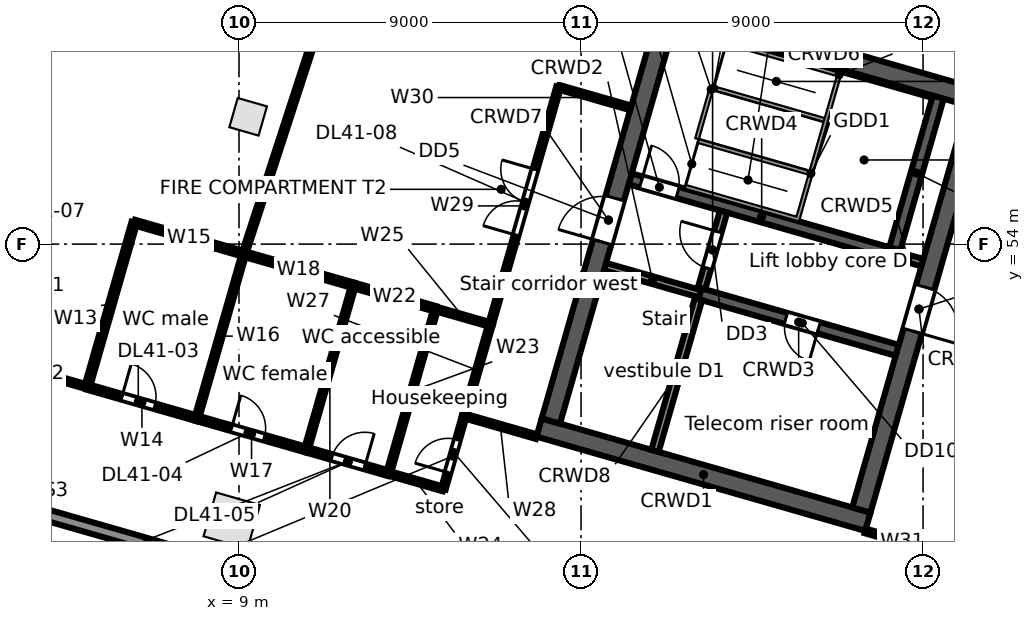
"""IFC4 building model, lengths in metres.
Left out: names, types, materials, properties, quantities, classifications, styles, units other than length and angle.
Written with IfcOpenShell. Run it as: python <this file> out.ifc"""

import sys

from ifc_helpers import new_model, si_unit, direction, frame, frame_2d, origin, origin_2d, place, context, subcontext, project, spatial, rectangle, extrude, element, fill, save


model = new_model("IFC4")
c1 = context("Model", 3, precision=1e-05, world=origin(), true_north=direction((0.0, 1.0)))
c2 = subcontext(c1, "Body", "Model", "MODEL_VIEW")
j1 = project(units=[si_unit("LENGTHUNIT", "METRE"), si_unit("PLANEANGLEUNIT", "RADIAN")], contexts=[c1])
p1 = place(None, origin())
s1 = spatial("IfcSite", under=j1, at=p1, CompositionType="ELEMENT")
p2 = place(p1, origin())
s2 = spatial("IfcBuilding", under=s1, at=p2, CompositionType="ELEMENT")
p3 = place(p2, frame((0.0, 0.0, 190.9)))
s3 = spatial("IfcBuildingStorey", under=s2, at=p3, CompositionType="ELEMENT", Elevation=190.9)
p4 = place(p3, frame((8.81, 46.722, 0.0), z_axis=(0.0, 0.0, 1.0), x_axis=(0.961261695938, -0.275637355817, 0.0)))
e1 = element("IfcColumn", 1, at=p4, inside=s3, PredefinedType="COLUMN", context=c2, shape_type="SweptSolid", body=[
    extrude(rectangle(XDim=1.2, YDim=1.2, at=origin_2d()), origin(), (0.0, 0.0, 1.0), 4.0),
])
p5 = place(p3, frame((9.241, 57.35, 0.0), z_axis=(0.0, 0.0, 1.0), x_axis=(0.961261695938, -0.275637355817, 0.0)))
e2 = element("IfcColumn", 2, at=p5, inside=s3, PredefinedType="COLUMN", context=c2, shape_type="SweptSolid", body=[
    extrude(rectangle(XDim=0.8, YDim=0.8, at=origin_2d()), origin(), (0.0, 0.0, 1.0), 4.0),
])
p6 = place(p3, frame((24.042, 41.106, 0.0), z_axis=(0.0, 0.0, 1.0), x_axis=(-0.961261693976, 0.275637362661, 0.0)))
e3 = element("IfcWall", 3, at=p6, inside=s3, PredefinedType="STANDARD", context=c2, shape_type="SweptSolid", body=[
    extrude(rectangle(XDim=24.948, YDim=0.3, at=frame_2d((12.474, 0.0))), origin(), (0.0, 0.0, 1.0), 3.68),
])
p7 = place(p6, frame((21.441, 0.0, 0.6)))
e4 = element("IfcOpeningElement", 4, at=p7, cuts=e3, PredefinedType="OPENING", context=c2, shape_type="SweptSolid", body=[
    extrude(rectangle(XDim=0.9, YDim=2.4, at=frame_2d((0.45, 1.2))), frame((0.0, 0.16, 0.0), z_axis=(0.0, -1.0, 0.0), x_axis=(1.0, 0.0, 0.0)), (0.0, 0.0, 1.0), 0.32),
])
p8 = place(p6, frame((13.121, 0.0, 0.6)))
e5 = element("IfcOpeningElement", 5, at=p8, cuts=e3, PredefinedType="OPENING", context=c2, shape_type="SweptSolid", body=[
    extrude(rectangle(XDim=0.9, YDim=2.4, at=frame_2d((0.45, 1.2))), frame((0.0, 0.16, 0.0), z_axis=(0.0, -1.0, 0.0), x_axis=(1.0, 0.0, 0.0)), (0.0, 0.0, 1.0), 0.32),
])
p9 = place(p6, frame((10.591, 0.0, 0.0)))
e6 = element("IfcOpeningElement", 6, at=p9, cuts=e3, PredefinedType="OPENING", context=c2, shape_type="SweptSolid", body=[
    extrude(rectangle(XDim=1.8, YDim=2.4, at=frame_2d((0.9, 1.2))), frame((0.0, 0.16, 0.0), z_axis=(0.0, -1.0, 0.0), x_axis=(1.0, 0.0, 0.0)), (0.0, 0.0, 1.0), 0.32),
])
p10 = place(p6, frame((4.8, 0.0, 0.6)))
e7 = element("IfcOpeningElement", 7, at=p10, cuts=e3, PredefinedType="OPENING", context=c2, shape_type="SweptSolid", body=[
    extrude(rectangle(XDim=0.9, YDim=2.4, at=frame_2d((0.45, 1.2))), frame((0.0, 0.16, 0.0), z_axis=(0.0, -1.0, 0.0), x_axis=(1.0, 0.0, 0.0)), (0.0, 0.0, 1.0), 0.32),
])
p11 = place(p6, frame((2.27, 0.0, 0.0)))
e8 = element("IfcOpeningElement", 8, at=p11, cuts=e3, PredefinedType="OPENING", context=c2, shape_type="SweptSolid", body=[
    extrude(rectangle(XDim=1.8, YDim=2.4, at=frame_2d((0.9, 1.2))), frame((0.0, 0.16, 0.0), z_axis=(0.0, -1.0, 0.0), x_axis=(1.0, 0.0, 0.0)), (0.0, 0.0, 1.0), 0.32),
])
p12 = place(p3, frame((37.399, 59.851, 0.0), z_axis=(0.0, 0.0, 1.0), x_axis=(-0.529919986982, -0.848047644532, 0.0)))
e9 = element("IfcWall", 9, at=p12, inside=s3, PredefinedType="STANDARD", context=c2, shape_type="SweptSolid", body=[
    extrude(rectangle(XDim=21.125, YDim=0.3, at=frame_2d((10.562, 0.0))), origin(), (0.0, 0.0, 1.0), 3.68),
])
p13 = place(p12, frame((16.687, 0.0, 0.6)))
e10 = element("IfcOpeningElement", 10, at=p13, cuts=e9, PredefinedType="OPENING", context=c2, shape_type="SweptSolid", body=[
    extrude(rectangle(XDim=0.9, YDim=2.4, at=frame_2d((0.45, 1.2))), frame((0.0, 0.16, 0.0), z_axis=(0.0, -1.0, 0.0), x_axis=(1.0, 0.0, 0.0)), (0.0, 0.0, 1.0), 0.32),
])
p14 = place(p12, frame((6.187, 0.0, 0.6)))
e11 = element("IfcOpeningElement", 11, at=p14, cuts=e9, PredefinedType="OPENING", context=c2, shape_type="SweptSolid", body=[
    extrude(rectangle(XDim=0.9, YDim=2.4, at=frame_2d((0.45, 1.2))), frame((0.0, 0.16, 0.0), z_axis=(0.0, -1.0, 0.0), x_axis=(1.0, 0.0, 0.0)), (0.0, 0.0, 1.0), 0.32),
])
p15 = place(p3, frame((16.897, 49.173, 0.0), z_axis=(0.0, 0.0, 1.0), x_axis=(0.96126248289, -0.275634611374, 0.0)))
e12 = element("IfcWall", 12, at=p15, inside=s3, PredefinedType="SOLIDWALL", context=c2, shape_type="SweptSolid", body=[
    extrude(rectangle(XDim=9.0, YDim=0.5, at=frame_2d((4.5, 0.0))), origin(), (0.0, 0.0, 1.0), 3.68),
])
p16 = place(p3, frame((18.632, 53.409, 0.0), z_axis=(0.0, 0.0, 1.0), x_axis=(0.961247078216, -0.275688328772, 0.0)))
e13 = element("IfcWall", 13, at=p16, inside=s3, PredefinedType="SOLIDWALL", context=c2, shape_type="SweptSolid", body=[
    extrude(rectangle(XDim=2.6, YDim=0.2, at=frame_2d((1.3, 0.0))), origin(), (0.0, 0.0, 1.0), 3.68),
])
p17 = place(p3, frame((21.131, 52.692, 0.0), z_axis=(0.0, 0.0, 1.0), x_axis=(0.961271043721, -0.27560475414, 0.0)))
e14 = element("IfcWall", 14, at=p17, inside=s3, PredefinedType="SOLIDWALL", context=c2, shape_type="SweptSolid", body=[
    extrude(rectangle(XDim=5.4, YDim=0.3, at=frame_2d((2.7, 0.0))), origin(), (0.0, 0.0, 1.0), 3.68),
])
p18 = place(p17, frame((2.35, 0.0, 0.0)))
e15 = element("IfcOpeningElement", 15, at=p18, cuts=e14, PredefinedType="OPENING", context=c2, shape_type="SweptSolid", body=[
    extrude(rectangle(XDim=0.9, YDim=2.1, at=frame_2d((0.45, 1.05))), frame((0.0, 0.16, 0.0), z_axis=(0.0, -1.0, 0.0), x_axis=(1.0, 0.0, 0.0)), (0.0, 0.0, 1.0), 0.32),
])
p19 = place(p3, frame((19.293, 55.716, 0.0), z_axis=(0.0, 0.0, 1.0), x_axis=(0.96125862491, -0.275648065539, 0.0)))
e16 = element("IfcWall", 16, at=p19, inside=s3, PredefinedType="SOLIDWALL", context=c2, shape_type="SweptSolid", body=[
    extrude(rectangle(XDim=7.2, YDim=0.3, at=frame_2d((3.6, 0.0))), origin(), (0.0, 0.0, 1.0), 3.68),
])
p20 = place(p19, frame((0.3, 0.0, 0.0)))
e17 = element("IfcOpeningElement", 17, at=p20, cuts=e16, PredefinedType="OPENING", context=c2, shape_type="SweptSolid", body=[
    extrude(rectangle(XDim=1.0, YDim=2.1, at=frame_2d((0.5, 1.05))), frame((0.0, 0.16, 0.0), z_axis=(0.0, -1.0, 0.0), x_axis=(1.0, 0.0, 0.0)), (0.0, 0.0, 1.0), 0.32),
])
p21 = place(p3, frame((26.214, 53.732, 0.0), z_axis=(0.0, 0.0, 1.0), x_axis=(0.961200870072, -0.275849392554, 0.0)))
e18 = element("IfcWall", 18, at=p21, inside=s3, PredefinedType="SOLIDWALL", context=c2, shape_type="SweptSolid", body=[
    extrude(rectangle(XDim=0.8, YDim=0.2, at=frame_2d((0.4, 0.0))), origin(), (0.0, 0.0, 1.0), 3.68),
])
p22 = place(p3, frame((20.067, 60.228, 0.0), z_axis=(0.0, 0.0, 1.0), x_axis=(0.96126248289, -0.275634611374, 0.0)))
e19 = element("IfcWall", 19, at=p22, inside=s3, PredefinedType="SOLIDWALL", context=c2, shape_type="SweptSolid", body=[
    extrude(rectangle(XDim=9.0, YDim=0.5, at=frame_2d((4.5, 0.0))), origin(), (0.0, 0.0, 1.0), 3.68),
])
p23 = place(p3, frame((17.206, 49.344, 0.0), z_axis=(0.0, 0.0, 1.0), x_axis=(0.275632651182, 0.961263044958, 0.0)))
e20 = element("IfcWall", 20, at=p23, inside=s3, PredefinedType="SOLIDWALL", context=c2, shape_type="SweptSolid", body=[
    extrude(rectangle(XDim=11.0, YDim=0.5, at=frame_2d((5.5, 0.0))), origin(), (0.0, 0.0, 1.0), 3.68),
])
p24 = place(p23, frame((4.9, 0.0, 0.0)))
e21 = element("IfcOpeningElement", 21, at=p24, cuts=e20, PredefinedType="OPENING", context=c2, shape_type="SweptSolid", body=[
    extrude(rectangle(XDim=1.2, YDim=2.1, at=frame_2d((0.6, 1.05))), frame((0.0, 0.26, 0.0), z_axis=(0.0, -1.0, 0.0), x_axis=(1.0, 0.0, 0.0)), (0.0, 0.0, 1.0), 0.52),
])
p25 = place(p3, frame((19.946, 48.559, 0.0), z_axis=(0.0, 0.0, 1.0), x_axis=(0.275668905258, 0.961252648721, 0.0)))
e22 = element("IfcWall", 22, at=p25, inside=s3, PredefinedType="SOLIDWALL", context=c2, shape_type="SweptSolid", body=[
    extrude(rectangle(XDim=4.15, YDim=0.2, at=frame_2d((2.075, 0.0))), origin(), (0.0, 0.0, 1.0), 3.68),
])
p26 = place(p3, frame((21.172, 52.837, 0.0), z_axis=(0.0, 0.0, 1.0), x_axis=(0.275657676022, 0.961255868981, 0.0)))
e23 = element("IfcWall", 23, at=p26, inside=s3, PredefinedType="PARTITIONING", context=c2, shape_type="SweptSolid", body=[
    extrude(rectangle(XDim=2.1, YDim=0.2, at=frame_2d((1.05, 0.0))), origin(), (0.0, 0.0, 1.0), 3.68),
])
p27 = place(p26, frame((0.55, 0.0, 0.0)))
e24 = element("IfcOpeningElement", 24, at=p27, cuts=e23, PredefinedType="OPENING", context=c2, shape_type="SweptSolid", body=[
    extrude(rectangle(XDim=1.0, YDim=2.1, at=frame_2d((0.5, 1.05))), frame((0.0, 0.11, 0.0), z_axis=(0.0, -1.0, 0.0), x_axis=(1.0, 0.0, 0.0)), (0.0, 0.0, 1.0), 0.22),
])
p28 = place(p3, frame((26.256, 53.876, 0.0), z_axis=(0.0, 0.0, 1.0), x_axis=(0.275614546295, 0.961268236171, 0.0)))
e25 = element("IfcWall", 25, at=p28, inside=s3, PredefinedType="SOLIDWALL", context=c2, shape_type="SweptSolid", body=[
    extrude(rectangle(XDim=4.15, YDim=0.3, at=frame_2d((2.075, 0.0))), origin(), (0.0, 0.0, 1.0), 3.68),
])
p29 = place(p3, frame((25.377, 47.002, 0.0), z_axis=(0.0, 0.0, 1.0), x_axis=(0.275632651182, 0.961263044958, 0.0)))
e26 = element("IfcWall", 26, at=p29, inside=s3, PredefinedType="SOLIDWALL", context=c2, shape_type="SweptSolid", body=[
    extrude(rectangle(XDim=11.0, YDim=0.5, at=frame_2d((5.5, 0.0))), origin(), (0.0, 0.0, 1.0), 3.68),
])
p30 = place(p29, frame((4.9, 0.0, 0.0)))
e27 = element("IfcOpeningElement", 27, at=p30, cuts=e26, PredefinedType="OPENING", context=c2, shape_type="SweptSolid", body=[
    extrude(rectangle(XDim=1.2, YDim=2.1, at=frame_2d((0.6, 1.05))), frame((0.0, 0.26, 0.0), z_axis=(0.0, -1.0, 0.0), x_axis=(1.0, 0.0, 0.0)), (0.0, 0.0, 1.0), 0.52),
])
p31 = place(p3, frame((2.601, 50.932, 0.0), z_axis=(0.0, 0.0, 1.0), x_axis=(0.961265528111, -0.275623991092, 0.0)))
e28 = element("IfcWall", 28, at=p31, inside=s3, PredefinedType="PARTITIONING", context=c2, shape_type="SweptSolid", body=[
    extrude(rectangle(XDim=2.5, YDim=0.125, at=frame_2d((1.25, 0.0))), origin(), (0.0, 0.0, 1.0), 3.68),
])
p32 = place(p3, frame((5.004, 50.243, 0.0), z_axis=(0.0, 0.0, 1.0), x_axis=(0.275838825927, 0.961203902464, 0.0)))
e29 = element("IfcWall", 29, at=p32, inside=s3, PredefinedType="PARTITIONING", context=c2, shape_type="SweptSolid", body=[
    extrude(rectangle(XDim=4.5, YDim=0.15, at=frame_2d((2.25, 0.0))), origin(), (0.0, 0.0, 1.0), 3.68),
])
p33 = place(p3, frame((5.004, 50.243, 0.0), z_axis=(0.0, 0.0, 1.0), x_axis=(0.961268664977, -0.27561305073, 0.0)))
e30 = element("IfcWall", 30, at=p33, inside=s3, PredefinedType="PARTITIONING", context=c2, shape_type="SweptSolid", body=[
    extrude(rectangle(XDim=3.0, YDim=0.15, at=frame_2d((1.5, 0.0))), origin(), (0.0, 0.0, 1.0), 3.68),
])
p34 = place(p33, frame((0.95, 0.0, 0.0)))
e31 = element("IfcOpeningElement", 31, at=p34, cuts=e30, PredefinedType="OPENING", context=c2, shape_type="SweptSolid", body=[
    extrude(rectangle(XDim=0.9, YDim=2.1, at=frame_2d((0.45, 1.05))), frame((0.0, 0.085, 0.0), z_axis=(0.0, -1.0, 0.0), x_axis=(1.0, 0.0, 0.0)), (0.0, 0.0, 1.0), 0.17),
])
p35 = place(p3, frame((6.245, 54.568, 0.0), z_axis=(0.0, 0.0, 1.0), x_axis=(0.961240918172, -0.275709806194, 0.0)))
e32 = element("IfcWall", 32, at=p35, inside=s3, PredefinedType="PARTITIONING", context=c2, shape_type="SweptSolid", body=[
    extrude(rectangle(XDim=3.0, YDim=0.15, at=frame_2d((1.5, 0.0))), origin(), (0.0, 0.0, 1.0), 2.852),
])
p36 = place(p3, frame((7.888, 49.416, 0.0), z_axis=(0.0, 0.0, 1.0), x_axis=(0.275803080638, 0.96121415965, 0.0)))
e33 = element("IfcWall", 33, at=p36, inside=s3, PredefinedType="PARTITIONING", context=c2, shape_type="SweptSolid", body=[
    extrude(rectangle(XDim=4.5, YDim=0.125, at=frame_2d((2.25, 0.0))), origin(), (0.0, 0.0, 1.0), 2.852),
])
p37 = place(p3, frame((7.888, 49.416, 0.0), z_axis=(0.0, 0.0, 1.0), x_axis=(0.961268664977, -0.27561305073, 0.0)))
e34 = element("IfcWall", 34, at=p37, inside=s3, PredefinedType="PARTITIONING", context=c2, shape_type="SweptSolid", body=[
    extrude(rectangle(XDim=3.0, YDim=0.15, at=frame_2d((1.5, 0.0))), origin(), (0.0, 0.0, 1.0), 2.748),
])
p38 = place(p37, frame((0.95, 0.0, 0.0)))
e35 = element("IfcOpeningElement", 35, at=p38, cuts=e34, PredefinedType="OPENING", context=c2, shape_type="SweptSolid", body=[
    extrude(rectangle(XDim=0.9, YDim=2.1, at=frame_2d((0.45, 1.05))), frame((0.0, 0.085, 0.0), z_axis=(0.0, -1.0, 0.0), x_axis=(1.0, 0.0, 0.0)), (0.0, 0.0, 1.0), 0.17),
])
p39 = place(p3, frame((9.129, 53.741, 0.0), z_axis=(0.0, 0.0, 1.0), x_axis=(0.961243927922, -0.275699312717, 0.0)))
e36 = element("IfcWall", 36, at=p39, inside=s3, PredefinedType="PARTITIONING", context=c2, shape_type="SweptSolid", body=[
    extrude(rectangle(XDim=2.999, YDim=0.15, at=frame_2d((1.5, 0.0))), origin(), (0.0, 0.0, 1.0), 2.748),
])
p40 = place(p3, frame((9.129, 53.741, 0.0), z_axis=(0.0, 0.0, 1.0), x_axis=(0.309576741849, 0.950874461171, 0.0)))
e37 = element("IfcWall", 37, at=p40, inside=s3, PredefinedType="PARTITIONING", context=c2, shape_type="SweptSolid", body=[
    extrude(rectangle(XDim=14.895, YDim=0.125, at=frame_2d((7.447, 0.0))), origin(), (0.0, 0.0, 1.0), 2.748),
])
p41 = place(p3, frame((10.772, 48.589, 0.0), z_axis=(0.0, 0.0, 1.0), x_axis=(0.275602532653, 0.961271680637, 0.0)))
e38 = element("IfcWall", 38, at=p41, inside=s3, PredefinedType="PARTITIONING", context=c2, shape_type="SweptSolid", body=[
    extrude(rectangle(XDim=4.499, YDim=0.125, at=frame_2d((2.25, 0.0))), origin(), (0.0, 0.0, 1.0), 3.68),
])
p42 = place(p3, frame((10.772, 48.589, 0.0), z_axis=(0.0, 0.0, 1.0), x_axis=(0.96127791106, -0.275580800688, 0.0)))
e39 = element("IfcWall", 39, at=p42, inside=s3, PredefinedType="PARTITIONING", context=c2, shape_type="SweptSolid", body=[
    extrude(rectangle(XDim=2.25, YDim=0.15, at=frame_2d((1.125, 0.0))), origin(), (0.0, 0.0, 1.0), 3.68),
])
p43 = place(p42, frame((0.7, 0.0, 0.0)))
e40 = element("IfcOpeningElement", 40, at=p43, cuts=e39, PredefinedType="OPENING", context=c2, shape_type="SweptSolid", body=[
    extrude(rectangle(XDim=0.9, YDim=2.1, at=frame_2d((0.45, 1.05))), frame((0.0, 0.085, 0.0), z_axis=(0.0, -1.0, 0.0), x_axis=(1.0, 0.0, 0.0)), (0.0, 0.0, 1.0), 0.17),
])
p44 = place(p3, frame((12.012, 52.914, 0.0), z_axis=(0.0, 0.0, 1.0), x_axis=(0.96127791106, -0.275580800688, 0.0)))
e41 = element("IfcWall", 41, at=p44, inside=s3, PredefinedType="PARTITIONING", context=c2, shape_type="SweptSolid", body=[
    extrude(rectangle(XDim=2.25, YDim=0.15, at=frame_2d((1.125, 0.0))), origin(), (0.0, 0.0, 1.0), 3.68),
])
p45 = place(p3, frame((12.935, 47.969, 0.0), z_axis=(0.0, 0.0, 1.0), x_axis=(0.275602532653, 0.961271680637, 0.0)))
e42 = element("IfcWall", 42, at=p45, inside=s3, PredefinedType="PARTITIONING", context=c2, shape_type="SweptSolid", body=[
    extrude(rectangle(XDim=4.499, YDim=0.125, at=frame_2d((2.25, 0.0))), origin(), (0.0, 0.0, 1.0), 3.68),
])
p46 = place(p3, frame((12.935, 47.969, 0.0), z_axis=(0.0, 0.0, 1.0), x_axis=(0.961154610169, -0.276010534854, 0.0)))
e43 = element("IfcWall", 43, at=p46, inside=s3, PredefinedType="PARTITIONING", context=c2, shape_type="SweptSolid", body=[
    extrude(rectangle(XDim=1.5, YDim=0.125, at=frame_2d((0.75, 0.0))), origin(), (0.0, 0.0, 1.0), 3.68),
])
p47 = place(p3, frame((14.175, 52.294, 0.0), z_axis=(0.0, 0.0, 1.0), x_axis=(0.961370232732, -0.275258561387, 0.0)))
e44 = element("IfcWall", 44, at=p47, inside=s3, PredefinedType="PARTITIONING", context=c2, shape_type="SweptSolid", body=[
    extrude(rectangle(XDim=1.5, YDim=0.125, at=frame_2d((0.75, 0.0))), origin(), (0.0, 0.0, 1.0), 3.68),
])
p48 = place(p3, frame((14.377, 47.555, 0.0), z_axis=(0.0, 0.0, 1.0), x_axis=(0.275446387355, 0.961316434736, 0.0)))
e45 = element("IfcWall", 45, at=p48, inside=s3, PredefinedType="PARTITIONING", context=c2, shape_type="SweptSolid", body=[
    extrude(rectangle(XDim=2.0, YDim=0.125, at=frame_2d((1.0, 0.0))), origin(), (0.0, 0.0, 1.0), 3.68),
])
p49 = place(p48, frame((0.45, 0.0, 0.0)))
e46 = element("IfcOpeningElement", 46, at=p49, cuts=e45, PredefinedType="OPENING", context=c2, shape_type="SweptSolid", body=[
    extrude(rectangle(XDim=0.9, YDim=2.1, at=frame_2d((0.45, 1.05))), frame((0.0, 0.073, 0.0), z_axis=(0.0, -1.0, 0.0), x_axis=(1.0, 0.0, 0.0)), (0.0, 0.0, 1.0), 0.145),
])
p50 = place(p3, frame((14.928, 49.478, 0.0), z_axis=(0.0, 0.0, 1.0), x_axis=(0.275598116036, 0.961272946898, 0.0)))
e47 = element("IfcWall", 47, at=p50, inside=s3, PredefinedType="PARTITIONING", context=c2, shape_type="SweptSolid", body=[
    extrude(rectangle(XDim=2.5, YDim=0.125, at=frame_2d((1.25, 0.0))), origin(), (0.0, 0.0, 1.0), 3.68),
])
p51 = place(p3, frame((14.928, 49.478, 0.0), z_axis=(0.0, 0.0, 1.0), x_axis=(0.961243778232, -0.27569983462, 0.0)))
e48 = element("IfcWall", 48, at=p51, inside=s3, PredefinedType="PARTITIONING", context=c2, shape_type="SweptSolid", body=[
    extrude(rectangle(XDim=1.977, YDim=0.125, at=frame_2d((0.988, 0.0))), origin(), (0.0, 0.0, 1.0), 3.68),
])
p52 = place(p3, frame((15.617, 51.881, 0.0), z_axis=(0.0, 0.0, 1.0), x_axis=(0.275703259795, 0.961242795832, 0.0)))
e49 = element("IfcWall", 49, at=p52, inside=s3, PredefinedType="PARTITIONING", context=c2, shape_type="SweptSolid", body=[
    extrude(rectangle(XDim=6.5, YDim=0.125, at=frame_2d((3.25, 0.0))), origin(), (0.0, 0.0, 1.0), 2.748),
])
p53 = place(p52, frame((2.45, 0.0, 0.0)))
e50 = element("IfcOpeningElement", 50, at=p53, cuts=e49, PredefinedType="OPENING", context=c2, shape_type="SweptSolid", body=[
    extrude(rectangle(XDim=1.8, YDim=2.1, at=frame_2d((0.9, 1.05))), frame((0.0, 0.073, 0.0), z_axis=(0.0, -1.0, 0.0), x_axis=(1.0, 0.0, 0.0)), (0.0, 0.0, 1.0), 0.145),
])
p54 = place(p3, frame((17.409, 58.129, 0.0), z_axis=(0.0, 0.0, 1.0), x_axis=(0.961253165474, -0.275667103345, 0.0)))
e51 = element("IfcWall", 51, at=p54, inside=s3, PredefinedType="PARTITIONING", context=c2, shape_type="SweptSolid", body=[
    extrude(rectangle(XDim=1.977, YDim=0.125, at=frame_2d((0.988, 0.0))), origin(), (0.0, 0.0, 1.0), 3.68),
])
p55 = place(p3, frame((25.479, 46.452, 0.0), z_axis=(0.0, 0.0, 1.0), x_axis=(0.961245725795, -0.275693044238, 0.0)))
e52 = element("IfcWall", 52, at=p55, inside=s3, PredefinedType="PARTITIONING", context=c2, shape_type="SweptSolid", body=[
    extrude(rectangle(XDim=2.023, YDim=0.125, at=frame_2d((1.012, 0.0))), origin(), (0.0, 0.0, 1.0), 2.952),
])
p56 = place(p20, origin())
e53 = element("IfcDoor", 53, at=p56, inside=s3, OperationType="SINGLE_SWING_LEFT", PredefinedType="DOOR", context=c2, shape_type="SweptSolid", body=[
    extrude(rectangle(XDim=1.0, YDim=2.1, at=frame_2d((0.5, 1.05))), frame((0.0, 0.025, 0.0), z_axis=(0.0, -1.0, 0.0), x_axis=(1.0, 0.0, 0.0)), (0.0, 0.0, 1.0), 0.05),
])
fill(e17, e53)
p57 = place(p27, origin())
e54 = element("IfcDoor", 54, at=p57, inside=s3, OperationType="SINGLE_SWING_RIGHT", PredefinedType="DOOR", context=c2, shape_type="SweptSolid", body=[
    extrude(rectangle(XDim=1.0, YDim=2.1, at=frame_2d((0.5, 1.05))), frame((0.0, 0.025, 0.0), z_axis=(0.0, -1.0, 0.0), x_axis=(1.0, 0.0, 0.0)), (0.0, 0.0, 1.0), 0.05),
])
fill(e24, e54)
p58 = place(p24, origin())
e55 = element("IfcDoor", 55, at=p58, inside=s3, OperationType="SINGLE_SWING_LEFT", PredefinedType="DOOR", context=c2, shape_type="SweptSolid", body=[
    extrude(rectangle(XDim=1.2, YDim=2.1, at=frame_2d((0.6, 1.05))), frame((0.0, 0.025, 0.0), z_axis=(0.0, -1.0, 0.0), x_axis=(1.0, 0.0, 0.0)), (0.0, 0.0, 1.0), 0.05),
])
fill(e21, e55)
p59 = place(p30, frame((1.2, 0.0, 0.0), z_axis=(0.0, 0.0, 1.0), x_axis=(-1.0, 0.0, 0.0)))
e56 = element("IfcDoor", 56, at=p59, inside=s3, OperationType="SINGLE_SWING_RIGHT", PredefinedType="DOOR", context=c2, shape_type="SweptSolid", body=[
    extrude(rectangle(XDim=1.2, YDim=2.1, at=frame_2d((0.6, 1.05))), frame((0.0, 0.025, 0.0), z_axis=(0.0, -1.0, 0.0), x_axis=(1.0, 0.0, 0.0)), (0.0, 0.0, 1.0), 0.05),
])
fill(e27, e56)
p60 = place(p18, frame((0.9, 0.0, 0.0), z_axis=(0.0, 0.0, 1.0), x_axis=(-1.0, 0.0, 0.0)))
e57 = element("IfcDoor", 57, at=p60, inside=s3, OperationType="SINGLE_SWING_LEFT", PredefinedType="DOOR", context=c2, shape_type="SweptSolid", body=[
    extrude(rectangle(XDim=0.9, YDim=2.1, at=frame_2d((0.45, 1.05))), frame((0.0, 0.025, 0.0), z_axis=(0.0, -1.0, 0.0), x_axis=(1.0, 0.0, 0.0)), (0.0, 0.0, 1.0), 0.05),
])
fill(e15, e57)
p61 = place(p34, origin())
e58 = element("IfcDoor", 58, at=p61, inside=s3, OperationType="SINGLE_SWING_LEFT", PredefinedType="DOOR", context=c2, shape_type="SweptSolid", body=[
    extrude(rectangle(XDim=0.9, YDim=2.1, at=frame_2d((0.45, 1.05))), frame((0.0, 0.025, 0.0), z_axis=(0.0, -1.0, 0.0), x_axis=(1.0, 0.0, 0.0)), (0.0, 0.0, 1.0), 0.05),
])
fill(e31, e58)
p62 = place(p38, origin())
e59 = element("IfcDoor", 59, at=p62, inside=s3, OperationType="SINGLE_SWING_LEFT", PredefinedType="DOOR", context=c2, shape_type="SweptSolid", body=[
    extrude(rectangle(XDim=0.9, YDim=2.1, at=frame_2d((0.45, 1.05))), frame((0.0, 0.025, 0.0), z_axis=(0.0, -1.0, 0.0), x_axis=(1.0, 0.0, 0.0)), (0.0, 0.0, 1.0), 0.05),
])
fill(e35, e59)
p63 = place(p43, origin())
e60 = element("IfcDoor", 60, at=p63, inside=s3, OperationType="SINGLE_SWING_RIGHT", PredefinedType="DOOR", context=c2, shape_type="SweptSolid", body=[
    extrude(rectangle(XDim=0.9, YDim=2.1, at=frame_2d((0.45, 1.05))), frame((0.0, 0.025, 0.0), z_axis=(0.0, -1.0, 0.0), x_axis=(1.0, 0.0, 0.0)), (0.0, 0.0, 1.0), 0.05),
])
fill(e40, e60)
p64 = place(p49, origin())
e61 = element("IfcDoor", 61, at=p64, inside=s3, OperationType="SINGLE_SWING_LEFT", PredefinedType="DOOR", context=c2, shape_type="SweptSolid", body=[
    extrude(rectangle(XDim=0.9, YDim=2.1, at=frame_2d((0.45, 1.05))), frame((0.0, 0.025, 0.0), z_axis=(0.0, -1.0, 0.0), x_axis=(1.0, 0.0, 0.0)), (0.0, 0.0, 1.0), 0.05),
])
fill(e46, e61)
p65 = place(p53, origin())
e62 = element("IfcDoor", 62, at=p65, inside=s3, OperationType="DOUBLE_DOOR_SINGLE_SWING", PredefinedType="DOOR", context=c2, shape_type="SweptSolid", body=[
    extrude(rectangle(XDim=1.8, YDim=2.1, at=frame_2d((0.9, 1.05))), frame((0.0, 0.025, 0.0), z_axis=(0.0, -1.0, 0.0), x_axis=(1.0, 0.0, 0.0)), (0.0, 0.0, 1.0), 0.05),
])
fill(e50, e62)
save(model, sys.argv[1])
